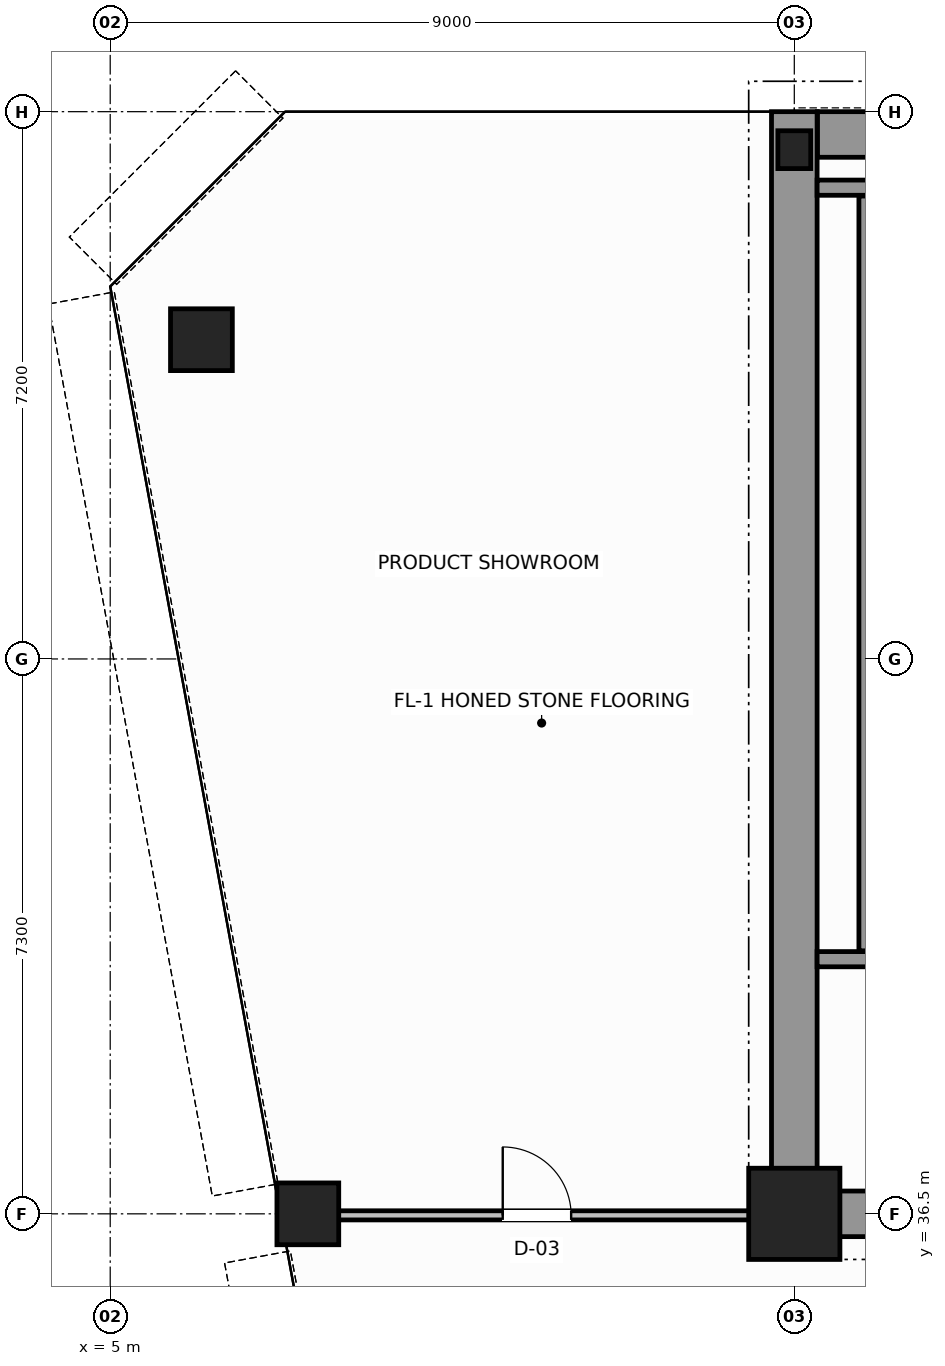
"""IFC4 building model, lengths in metres.
Left out: names, types, materials, properties, quantities, classifications, styles, units other than length and angle.
Written with IfcOpenShell. Run it as: python <this file> out.ifc"""

import sys

from ifc_helpers import new_model, si_unit, direction, frame, frame_2d, origin, origin_2d, place, context, subcontext, project, spatial, rectangle, hollow_circle, i_section, extrude, source, transform, mapped, element, fill, save


model = new_model("IFC4")
c1 = context("Model", 3, precision=1e-05, world=origin(), true_north=direction((0.0, 1.0)))
c2 = subcontext(c1, "Body", "Model", "MODEL_VIEW")
j1 = project(units=[si_unit("LENGTHUNIT", "METRE"), si_unit("PLANEANGLEUNIT", "RADIAN")], contexts=[c1])
p1 = place(None, origin())
s1 = spatial("IfcSite", under=j1, at=p1, CompositionType="ELEMENT")
p2 = place(p1, origin())
s2 = spatial("IfcBuilding", under=s1, at=p2, CompositionType="ELEMENT")
p3 = place(p2, frame((0.0, 0.0, 195.6)))
s3 = spatial("IfcBuildingStorey", under=s2, at=p3, CompositionType="ELEMENT", Elevation=195.6)
m1 = source(origin(), c2, "Body", "SweptSolid", [
    extrude(rectangle(XDim=1.2, YDim=1.2, at=origin_2d()), origin(), (0.0, 0.0, 1.0), 3.8),
])
p4 = place(p3, frame((14.0, 36.5, 0.0), z_axis=(0.0, 0.0, 1.0), x_axis=(1.0, 0.0, 0.0)))
e1 = element("IfcColumn", 1, at=p4, inside=s3, PredefinedType="COLUMN", context=c2, shape_type="MappedRepresentation", body=[
    mapped(m1, transform((0.0, 0.0, 0.0), scale=1.0)),
])
m2 = source(origin(), c2, "Body", "SweptSolid", [
    extrude(i_section(OverallWidth=0.432, OverallDepth=0.498, WebThickness=0.055, FlangeThickness=0.068, FilletRadius=0.015, at=origin_2d()), origin(), (0.0, 0.0, 1.0), 3.8),
])
p5 = place(p3, frame((14.0, 50.5, 0.0), z_axis=(0.0, 0.0, 1.0), x_axis=(1.0, 0.0, 0.0)))
e2 = element("IfcColumn", 2, at=p5, inside=s3, PredefinedType="COLUMN", context=c2, shape_type="MappedRepresentation", body=[
    mapped(m2, transform((0.0, 0.0, 0.0), scale=1.0)),
])
m3 = source(origin(), c2, "Body", "SweptSolid", [
    extrude(hollow_circle(Radius=0.406, WallThickness=0.04, at=origin_2d()), origin(), (0.0, 0.0, 1.0), 3.8),
])
for number, where, z_axis, x_axis in (
    (3, (6.2, 48.0, 0.0), (0.0, 0.0, 1.0), (1.0, 0.0, 0.0)),
    (4, (7.6, 36.5, 0.0), (0.0, 0.0, 1.0), (1.0, 0.0, 0.0)),
):
    element("IfcColumn", number, at=place(p3, frame(where, z_axis=z_axis, x_axis=x_axis)), inside=s3, PredefinedType="COLUMN", context=c2, shape_type="MappedRepresentation", body=[
        mapped(m3, transform((0.0, 0.0, 0.0), scale=1.0)),
    ])
p6 = place(p3, frame((14.304, 50.7, 0.0), z_axis=(0.0, 0.0, 1.0), x_axis=(1.0, 0.0, 0.0)))
e5 = element("IfcWall", 5, at=p6, inside=s3, PredefinedType="SHEAR", context=c2, shape_type="SweptSolid", body=[
    extrude(rectangle(XDim=19.694, YDim=0.6, at=frame_2d((9.847, 0.0))), origin(), (0.0, 0.0, 1.0), 3.8),
])
p7 = place(p3, frame((14.0, 36.5, 0.0), z_axis=(0.0, 0.0, 1.0), x_axis=(0.0, 1.0, 0.0)))
e6 = element("IfcWall", 6, at=p7, inside=s3, PredefinedType="SHEAR", context=c2, shape_type="SweptSolid", body=[
    extrude(rectangle(XDim=14.5, YDim=0.6, at=frame_2d((7.25, 0.0))), origin(), (0.0, 0.0, 1.0), 3.8),
])
p8 = place(p3, frame((14.32, 36.5, 0.0), z_axis=(0.0, 0.0, 1.0), x_axis=(1.0, 0.0, 0.0)))
e7 = element("IfcWall", 7, at=p8, inside=s3, PredefinedType="SHEAR", context=c2, shape_type="SweptSolid", body=[
    extrude(rectangle(XDim=3.88, YDim=0.6, at=frame_2d((1.94, 0.0))), origin(), (0.0, 0.0, 1.0), 2.58),
])
p9 = place(p3, frame((14.3, 39.85, 0.0), z_axis=(0.0, 0.0, 1.0), x_axis=(1.0, 0.0, 0.0)))
e8 = element("IfcWall", 8, at=p9, inside=s3, PredefinedType="SOLIDWALL", context=c2, shape_type="SweptSolid", body=[
    extrude(rectangle(XDim=4.3, YDim=0.2, at=frame_2d((2.15, 0.0))), origin(), (0.0, 0.0, 1.0), 3.8),
])
p10 = place(p9, frame((1.875, 0.0, 0.0)))
e9 = element("IfcOpeningElement", 9, at=p10, cuts=e8, PredefinedType="OPENING", context=c2, shape_type="SweptSolid", body=[
    extrude(rectangle(XDim=1.1, YDim=2.15, at=frame_2d((0.55, 1.075))), frame((0.0, 0.11, 0.0), z_axis=(0.0, -1.0, 0.0), x_axis=(1.0, 0.0, 0.0)), (0.0, 0.0, 1.0), 0.22),
])
p11 = place(p3, frame((14.3, 50.0, 0.0), z_axis=(0.0, 0.0, 1.0), x_axis=(1.0, 0.0, 0.0)))
e10 = element("IfcWall", 10, at=p11, inside=s3, PredefinedType="SOLIDWALL", context=c2, shape_type="SweptSolid", body=[
    extrude(rectangle(XDim=4.3, YDim=0.2, at=frame_2d((2.15, 0.0))), origin(), (0.0, 0.0, 1.0), 3.8),
])
p12 = place(p3, frame((14.95, 39.96, 0.0), z_axis=(0.0, 0.0, 1.0), x_axis=(0.0, 1.0, 0.0)))
e11 = element("IfcWall", 11, at=p12, inside=s3, PredefinedType="SOLIDWALL", context=c2, shape_type="SweptSolid", body=[
    extrude(rectangle(XDim=9.93, YDim=0.2, at=frame_2d((4.965, 0.0))), origin(), (0.0, 0.0, 1.0), 3.8),
])
p13 = place(p3, frame((7.289, 36.48, 0.0), z_axis=(0.0, 0.0, 1.0), x_axis=(1.0, 0.0, 0.0)))
e12 = element("IfcWall", 12, at=p13, inside=s3, PredefinedType="PARTITIONING", context=c2, shape_type="SweptSolid", body=[
    extrude(rectangle(XDim=6.651, YDim=0.12, at=frame_2d((3.325, 0.0))), origin(), (0.0, 0.0, 1.0), 2.97),
])
p14 = place(p13, frame((2.875, 0.0, 0.0)))
e13 = element("IfcOpeningElement", 13, at=p14, cuts=e12, PredefinedType="OPENING", context=c2, shape_type="SweptSolid", body=[
    extrude(rectangle(XDim=0.9, YDim=2.15, at=frame_2d((0.45, 1.075))), frame((0.0, 0.07, 0.0), z_axis=(0.0, -1.0, 0.0), x_axis=(1.0, 0.0, 0.0)), (0.0, 0.0, 1.0), 0.14),
])
m4 = source(origin(), c2, "Body", "SweptSolid", [
    extrude(rectangle(XDim=0.9, YDim=2.15, at=frame_2d((0.45, 1.075))), frame((0.0, 0.025, 0.0), z_axis=(0.0, -1.0, 0.0), x_axis=(1.0, 0.0, 0.0)), (0.0, 0.0, 1.0), 0.05),
])
p15 = place(p14, origin())
e14 = element("IfcDoor", 14, at=p15, inside=s3, OperationType="SINGLE_SWING_LEFT", PredefinedType="DOOR", context=c2, shape_type="MappedRepresentation", body=[
    mapped(m4, transform((0.0, 0.0, 0.0), scale=1.0)),
])
fill(e13, e14)
save(model, sys.argv[1])
